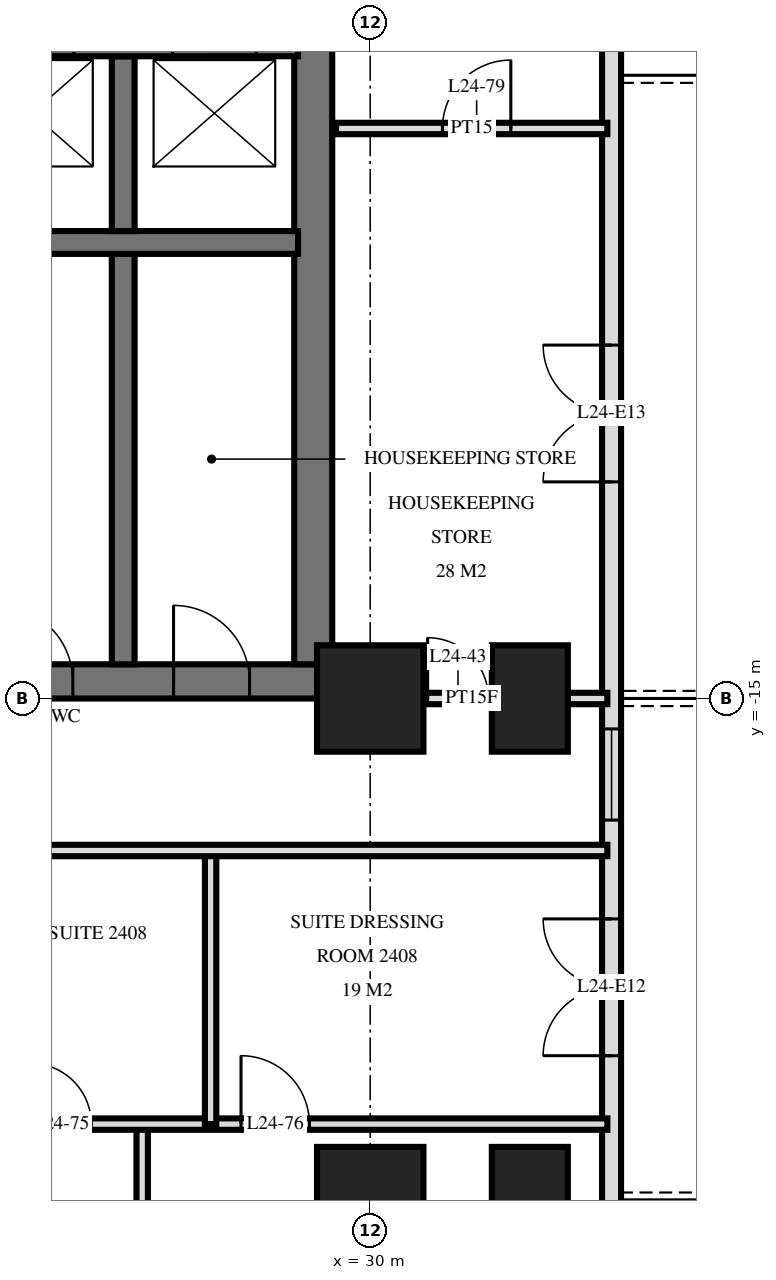
"""IFC4 building model, lengths in metres.
Left out: names, types, materials, properties, quantities, classifications, styles, units other than length and angle.
Written with IfcOpenShell. Run it as: python <this file> out.ifc"""

import sys

from ifc_helpers import new_model, si_unit, direction, frame, frame_2d, origin, origin_2d, place, context, subcontext, project, spatial, rectangle, extrude, element, fill, save


model = new_model("IFC4")
c1 = context("Model", 3, precision=1e-05, world=origin(), true_north=direction((0.0, 1.0)))
c2 = subcontext(c1, "Body", "Model", "MODEL_VIEW")
j1 = project(units=[si_unit("LENGTHUNIT", "METRE"), si_unit("PLANEANGLEUNIT", "RADIAN")], contexts=[c1])
p1 = place(None, origin())
s1 = spatial("IfcSite", under=j1, at=p1, CompositionType="ELEMENT")
p2 = place(p1, origin())
s2 = spatial("IfcBuilding", under=s1, at=p2, CompositionType="ELEMENT")
p3 = place(p2, frame((0.0, 0.0, 96.0)))
s3 = spatial("IfcBuildingStorey", under=s2, at=p3, CompositionType="ELEMENT", Elevation=96.0)
for number, where, z_axis, x_axis in (
    (1, (30.0, -21.6, 0.0), (0.0, 0.0, 1.0), (1.0, 0.0, 0.0)),
    (2, (30.0, -15.0, 0.0), (0.0, 0.0, 1.0), (1.0, 0.0, 0.0)),
):
    element("IfcColumn", number, at=place(p3, frame(where, z_axis=z_axis, x_axis=x_axis)), inside=s3, PredefinedType="COLUMN", context=c2, shape_type="SweptSolid", body=[
        extrude(rectangle(XDim=1.4, YDim=1.4, at=origin_2d()), origin(), (0.0, 0.0, 1.0), 3.6),
    ])
for number, where, z_axis, x_axis in (
    (3, (32.1, -21.6, 0.0), (0.0, 0.0, 1.0), (0.0, 1.0, 0.0)),
    (4, (32.1, -15.0, 0.0), (0.0, 0.0, 1.0), (0.0, 1.0, 0.0)),
):
    element("IfcColumn", number, at=place(p3, frame(where, z_axis=z_axis, x_axis=x_axis)), inside=s3, PredefinedType="COLUMN", context=c2, shape_type="SweptSolid", body=[
        extrude(rectangle(XDim=1.4, YDim=1.0, at=origin_2d()), origin(), (0.0, 0.0, 1.0), 3.6),
    ])
p4 = place(p3, frame((10.0, -14.775, 0.0), z_axis=(0.0, 0.0, 1.0), x_axis=(1.0, 0.0, 0.0)))
e5 = element("IfcWall", 5, at=p4, inside=s3, PredefinedType="SHEAR", context=c2, shape_type="SweptSolid", body=[
    extrude(rectangle(XDim=19.5, YDim=0.45, at=frame_2d((9.75, 0.0))), origin(), (0.0, 0.0, 1.0), 3.6),
])
p5 = place(p4, frame((7.1, 0.0, 0.0)))
e6 = element("IfcOpeningElement", 6, at=p5, cuts=e5, PredefinedType="OPENING", context=c2, shape_type="SweptSolid", body=[
    extrude(rectangle(XDim=1.2, YDim=2.1, at=frame_2d((0.6, 1.05))), frame((0.0, 0.235, 0.0), z_axis=(0.0, -1.0, 0.0), x_axis=(1.0, 0.0, 0.0)), (0.0, 0.0, 1.0), 0.47),
])
p6 = place(p4, frame((4.15, 0.0, 0.0)))
e7 = element("IfcOpeningElement", 7, at=p6, cuts=e5, PredefinedType="OPENING", context=c2, shape_type="SweptSolid", body=[
    extrude(rectangle(XDim=1.1, YDim=2.1, at=frame_2d((0.55, 1.05))), frame((0.0, 0.235, 0.0), z_axis=(0.0, -1.0, 0.0), x_axis=(1.0, 0.0, 0.0)), (0.0, 0.0, 1.0), 0.47),
])
p7 = place(p4, frame((10.1, 0.0, 0.0)))
e8 = element("IfcOpeningElement", 8, at=p7, cuts=e5, PredefinedType="OPENING", context=c2, shape_type="SweptSolid", body=[
    extrude(rectangle(XDim=0.9, YDim=2.1, at=frame_2d((0.45, 1.05))), frame((0.0, 0.235, 0.0), z_axis=(0.0, -1.0, 0.0), x_axis=(1.0, 0.0, 0.0)), (0.0, 0.0, 1.0), 0.47),
])
p8 = place(p4, frame((12.45, 0.0, 0.0)))
e9 = element("IfcOpeningElement", 9, at=p8, cuts=e5, PredefinedType="OPENING", context=c2, shape_type="SweptSolid", body=[
    extrude(rectangle(XDim=1.0, YDim=2.1, at=frame_2d((0.5, 1.05))), frame((0.0, 0.235, 0.0), z_axis=(0.0, -1.0, 0.0), x_axis=(1.0, 0.0, 0.0)), (0.0, 0.0, 1.0), 0.47),
])
p9 = place(p4, frame((15.087, 0.0, 0.0)))
e10 = element("IfcOpeningElement", 10, at=p9, cuts=e5, PredefinedType="OPENING", context=c2, shape_type="SweptSolid", body=[
    extrude(rectangle(XDim=1.0, YDim=2.1, at=frame_2d((0.5, 1.05))), frame((0.0, 0.235, 0.0), z_axis=(0.0, -1.0, 0.0), x_axis=(1.0, 0.0, 0.0)), (0.0, 0.0, 1.0), 0.47),
])
p10 = place(p4, frame((17.413, 0.0, 0.0)))
e11 = element("IfcOpeningElement", 11, at=p10, cuts=e5, PredefinedType="OPENING", context=c2, shape_type="SweptSolid", body=[
    extrude(rectangle(XDim=1.0, YDim=2.1, at=frame_2d((0.5, 1.05))), frame((0.0, 0.235, 0.0), z_axis=(0.0, -1.0, 0.0), x_axis=(1.0, 0.0, 0.0)), (0.0, 0.0, 1.0), 0.47),
])
p11 = place(p3, frame((29.25, -14.55, 0.0), z_axis=(0.0, 0.0, 1.0), x_axis=(0.0, 1.0, 0.0)))
e12 = element("IfcWall", 12, at=p11, inside=s3, PredefinedType="SHEAR", context=c2, shape_type="SweptSolid", body=[
    extrude(rectangle(XDim=14.1, YDim=0.5, at=frame_2d((7.05, 0.0))), origin(), (0.0, 0.0, 1.0), 3.6),
])
p12 = place(p3, frame((10.35, -6.4, 0.0), z_axis=(0.0, 0.0, 1.0), x_axis=(1.0, 0.0, 0.0)))
e13 = element("IfcWall", 13, at=p12, inside=s3, PredefinedType="SHEAR", context=c2, shape_type="SweptSolid", body=[
    extrude(rectangle(XDim=18.7, YDim=0.3, at=frame_2d((9.35, 0.0))), origin(), (0.0, 0.0, 1.0), 3.6),
])
p13 = place(p12, frame((14.65, 0.0, 0.0)))
e14 = element("IfcOpeningElement", 14, at=p13, cuts=e13, PredefinedType="OPENING", context=c2, shape_type="SweptSolid", body=[
    extrude(rectangle(XDim=1.1, YDim=2.1, at=frame_2d((0.55, 1.05))), frame((0.0, 0.16, 0.0), z_axis=(0.0, -1.0, 0.0), x_axis=(1.0, 0.0, 0.0)), (0.0, 0.0, 1.0), 0.32),
])
p14 = place(p12, frame((17.05, 0.0, 0.0)))
e15 = element("IfcOpeningElement", 15, at=p14, cuts=e13, PredefinedType="OPENING", context=c2, shape_type="SweptSolid", body=[
    extrude(rectangle(XDim=1.1, YDim=2.1, at=frame_2d((0.55, 1.05))), frame((0.0, 0.16, 0.0), z_axis=(0.0, -1.0, 0.0), x_axis=(1.0, 0.0, 0.0)), (0.0, 0.0, 1.0), 0.32),
])
p15 = place(p12, frame((6.8, 0.0, 0.0)))
e16 = element("IfcOpeningElement", 16, at=p15, cuts=e13, PredefinedType="OPENING", context=c2, shape_type="SweptSolid", body=[
    extrude(rectangle(XDim=1.1, YDim=2.1, at=frame_2d((0.55, 1.05))), frame((0.0, 0.16, 0.0), z_axis=(0.0, -1.0, 0.0), x_axis=(1.0, 0.0, 0.0)), (0.0, 0.0, 1.0), 0.32),
])
p16 = place(p12, frame((12.1, 0.0, 0.0)))
e17 = element("IfcOpeningElement", 17, at=p16, cuts=e13, PredefinedType="OPENING", context=c2, shape_type="SweptSolid", body=[
    extrude(rectangle(XDim=1.0, YDim=2.1, at=frame_2d((0.5, 1.05))), frame((0.0, 0.16, 0.0), z_axis=(0.0, -1.0, 0.0), x_axis=(1.0, 0.0, 0.0)), (0.0, 0.0, 1.0), 0.32),
])
p17 = place(p3, frame((10.35, -9.0, 0.0), z_axis=(0.0, 0.0, 1.0), x_axis=(1.0, 0.0, 0.0)))
e18 = element("IfcWall", 18, at=p17, inside=s3, PredefinedType="SHEAR", context=c2, shape_type="SweptSolid", body=[
    extrude(rectangle(XDim=18.7, YDim=0.3, at=frame_2d((9.35, 0.0))), origin(), (0.0, 0.0, 1.0), 3.6),
])
p18 = place(p17, frame((3.8, 0.0, 0.0)))
e19 = element("IfcOpeningElement", 19, at=p18, cuts=e18, PredefinedType="OPENING", context=c2, shape_type="SweptSolid", body=[
    extrude(rectangle(XDim=1.1, YDim=2.1, at=frame_2d((0.55, 1.05))), frame((0.0, 0.16, 0.0), z_axis=(0.0, -1.0, 0.0), x_axis=(1.0, 0.0, 0.0)), (0.0, 0.0, 1.0), 0.32),
])
p19 = place(p3, frame((26.75, -8.85, 0.0), z_axis=(0.0, 0.0, 1.0), x_axis=(0.0, 1.0, 0.0)))
e20 = element("IfcWall", 20, at=p19, inside=s3, PredefinedType="SHEAR", context=c2, shape_type="SweptSolid", body=[
    extrude(rectangle(XDim=2.3, YDim=0.3, at=frame_2d((1.15, 0.0))), origin(), (0.0, 0.0, 1.0), 3.6),
])
p20 = place(p3, frame((26.75, -14.55, 0.0), z_axis=(0.0, 0.0, 1.0), x_axis=(0.0, 1.0, 0.0)))
e21 = element("IfcWall", 21, at=p20, inside=s3, PredefinedType="SHEAR", context=c2, shape_type="SweptSolid", body=[
    extrude(rectangle(XDim=5.4, YDim=0.3, at=frame_2d((2.7, 0.0))), origin(), (0.0, 0.0, 1.0), 3.6),
])
p21 = place(p3, frame((33.175, -24.875, 0.0), z_axis=(0.0, 0.0, 1.0), x_axis=(0.0, 1.0, 0.0)))
e22 = element("IfcWall", 22, at=p21, inside=s3, PredefinedType="SOLIDWALL", context=c2, shape_type="SweptSolid", body=[
    extrude(rectangle(XDim=21.551, YDim=0.25, at=frame_2d((10.775, 0.0))), origin(), (0.0, 0.0, 1.0), 3.32),
])
p22 = place(p21, frame((0.575, 0.0, 0.0)))
e23 = element("IfcOpeningElement", 23, at=p22, cuts=e22, PredefinedType="OPENING", context=c2, shape_type="SweptSolid", body=[
    extrude(rectangle(XDim=1.8, YDim=2.4, at=frame_2d((0.9, 1.2))), frame((0.0, 0.135, 0.0), z_axis=(0.0, -1.0, 0.0), x_axis=(1.0, 0.0, 0.0)), (0.0, 0.0, 1.0), 0.27),
])
p23 = place(p21, frame((5.175, 0.0, 0.0)))
e24 = element("IfcOpeningElement", 24, at=p23, cuts=e22, PredefinedType="OPENING", context=c2, shape_type="SweptSolid", body=[
    extrude(rectangle(XDim=1.8, YDim=2.4, at=frame_2d((0.9, 1.2))), frame((0.0, 0.135, 0.0), z_axis=(0.0, -1.0, 0.0), x_axis=(1.0, 0.0, 0.0)), (0.0, 0.0, 1.0), 0.27),
])
p24 = place(p21, frame((8.275, 0.0, 0.3)))
e25 = element("IfcOpeningElement", 25, at=p24, cuts=e22, PredefinedType="OPENING", context=c2, shape_type="SweptSolid", body=[
    extrude(rectangle(XDim=1.2, YDim=2.1, at=frame_2d((0.6, 1.05))), frame((0.0, 0.135, 0.0), z_axis=(0.0, -1.0, 0.0), x_axis=(1.0, 0.0, 0.0)), (0.0, 0.0, 1.0), 0.27),
])
p25 = place(p21, frame((12.725, 0.0, 0.0)))
e26 = element("IfcOpeningElement", 26, at=p25, cuts=e22, PredefinedType="OPENING", context=c2, shape_type="SweptSolid", body=[
    extrude(rectangle(XDim=1.8, YDim=2.4, at=frame_2d((0.9, 1.2))), frame((0.0, 0.135, 0.0), z_axis=(0.0, -1.0, 0.0), x_axis=(1.0, 0.0, 0.0)), (0.0, 0.0, 1.0), 0.27),
])
p26 = place(p3, frame((27.9, -20.6, 0.0), z_axis=(0.0, 0.0, 1.0), x_axis=(0.0, 1.0, 0.0)))
e27 = element("IfcWall", 27, at=p26, inside=s3, PredefinedType="PARTITIONING", context=c2, shape_type="SweptSolid", body=[
    extrude(rectangle(XDim=3.6, YDim=0.15, at=frame_2d((1.8, 0.0))), origin(), (0.0, 0.0, 1.0), 3.32),
])
p27 = place(p3, frame((27.0, -29.22, 0.0), z_axis=(0.0, 0.0, 1.0), x_axis=(0.0, 1.0, 0.0)))
e28 = element("IfcWall", 28, at=p27, inside=s3, PredefinedType="PARTITIONING", context=c2, shape_type="SweptSolid", body=[
    extrude(rectangle(XDim=8.62, YDim=0.15, at=frame_2d((4.31, 0.0))), origin(), (0.0, 0.0, 1.0), 3.32),
])
p28 = place(p27, frame((3.77, 0.0, 0.0)))
e29 = element("IfcOpeningElement", 29, at=p28, cuts=e28, PredefinedType="OPENING", context=c2, shape_type="SweptSolid", body=[
    extrude(rectangle(XDim=0.9, YDim=2.1, at=frame_2d((0.45, 1.05))), frame((0.0, 0.085, 0.0), z_axis=(0.0, -1.0, 0.0), x_axis=(1.0, 0.0, 0.0)), (0.0, 0.0, 1.0), 0.17),
])
p29 = place(p3, frame((24.9, -20.6, 0.0), z_axis=(0.0, 0.0, 1.0), x_axis=(1.0, 0.0, 0.0)))
e30 = element("IfcWall", 30, at=p29, inside=s3, PredefinedType="PARTITIONING", context=c2, shape_type="SweptSolid", body=[
    extrude(rectangle(XDim=8.22, YDim=0.15, at=frame_2d((4.11, 0.0))), origin(), (0.0, 0.0, 1.0), 3.32),
])
p30 = place(p29, frame((0.63, 0.0, 0.0)))
e31 = element("IfcOpeningElement", 31, at=p30, cuts=e30, PredefinedType="OPENING", context=c2, shape_type="SweptSolid", body=[
    extrude(rectangle(XDim=0.8, YDim=2.1, at=frame_2d((0.4, 1.05))), frame((0.0, 0.085, 0.0), z_axis=(0.0, -1.0, 0.0), x_axis=(1.0, 0.0, 0.0)), (0.0, 0.0, 1.0), 0.17),
])
p31 = place(p29, frame((3.4, 0.0, 0.0)))
e32 = element("IfcOpeningElement", 32, at=p31, cuts=e30, PredefinedType="OPENING", context=c2, shape_type="SweptSolid", body=[
    extrude(rectangle(XDim=0.9, YDim=2.1, at=frame_2d((0.45, 1.05))), frame((0.0, 0.085, 0.0), z_axis=(0.0, -1.0, 0.0), x_axis=(1.0, 0.0, 0.0)), (0.0, 0.0, 1.0), 0.17),
])
p32 = place(p3, frame((-33.12, -17.0, 0.0), z_axis=(0.0, 0.0, 1.0), x_axis=(1.0, 0.0, 0.0)))
e33 = element("IfcWall", 33, at=p32, inside=s3, PredefinedType="PARTITIONING", context=c2, shape_type="SweptSolid", body=[
    extrude(rectangle(XDim=66.24, YDim=0.15, at=frame_2d((33.12, 0.0))), origin(), (0.0, 0.0, 1.0), 3.32),
])
p33 = place(p32, frame((16.27, 0.0, 0.0)))
e34 = element("IfcOpeningElement", 34, at=p33, cuts=e33, PredefinedType="OPENING", context=c2, shape_type="SweptSolid", body=[
    extrude(rectangle(XDim=1.0, YDim=2.1, at=frame_2d((0.5, 1.05))), frame((0.0, 0.085, 0.0), z_axis=(0.0, -1.0, 0.0), x_axis=(1.0, 0.0, 0.0)), (0.0, 0.0, 1.0), 0.17),
])
p34 = place(p32, frame((22.97, 0.0, 0.0)))
e35 = element("IfcOpeningElement", 35, at=p34, cuts=e33, PredefinedType="OPENING", context=c2, shape_type="SweptSolid", body=[
    extrude(rectangle(XDim=1.0, YDim=2.1, at=frame_2d((0.5, 1.05))), frame((0.0, 0.085, 0.0), z_axis=(0.0, -1.0, 0.0), x_axis=(1.0, 0.0, 0.0)), (0.0, 0.0, 1.0), 0.17),
])
p35 = place(p32, frame((34.42, 0.0, 0.0)))
e36 = element("IfcOpeningElement", 36, at=p35, cuts=e33, PredefinedType="OPENING", context=c2, shape_type="SweptSolid", body=[
    extrude(rectangle(XDim=1.0, YDim=2.1, at=frame_2d((0.5, 1.05))), frame((0.0, 0.085, 0.0), z_axis=(0.0, -1.0, 0.0), x_axis=(1.0, 0.0, 0.0)), (0.0, 0.0, 1.0), 0.17),
])
p36 = place(p32, frame((39.22, 0.0, 0.0)))
e37 = element("IfcOpeningElement", 37, at=p36, cuts=e33, PredefinedType="OPENING", context=c2, shape_type="SweptSolid", body=[
    extrude(rectangle(XDim=1.0, YDim=2.1, at=frame_2d((0.5, 1.05))), frame((0.0, 0.085, 0.0), z_axis=(0.0, -1.0, 0.0), x_axis=(1.0, 0.0, 0.0)), (0.0, 0.0, 1.0), 0.17),
])
p37 = place(p32, frame((42.27, 0.0, 0.0)))
e38 = element("IfcOpeningElement", 38, at=p37, cuts=e33, PredefinedType="OPENING", context=c2, shape_type="SweptSolid", body=[
    extrude(rectangle(XDim=1.0, YDim=2.1, at=frame_2d((0.5, 1.05))), frame((0.0, 0.085, 0.0), z_axis=(0.0, -1.0, 0.0), x_axis=(1.0, 0.0, 0.0)), (0.0, 0.0, 1.0), 0.17),
])
p38 = place(p32, frame((45.82, 0.0, 0.0)))
e39 = element("IfcOpeningElement", 39, at=p38, cuts=e33, PredefinedType="OPENING", context=c2, shape_type="SweptSolid", body=[
    extrude(rectangle(XDim=1.0, YDim=2.1, at=frame_2d((0.5, 1.05))), frame((0.0, 0.085, 0.0), z_axis=(0.0, -1.0, 0.0), x_axis=(1.0, 0.0, 0.0)), (0.0, 0.0, 1.0), 0.17),
])
p39 = place(p32, frame((13.42, 0.0, 0.0)))
e40 = element("IfcOpeningElement", 40, at=p39, cuts=e33, PredefinedType="OPENING", context=c2, shape_type="SweptSolid", body=[
    extrude(rectangle(XDim=1.0, YDim=2.1, at=frame_2d((0.5, 1.05))), frame((0.0, 0.085, 0.0), z_axis=(0.0, -1.0, 0.0), x_axis=(1.0, 0.0, 0.0)), (0.0, 0.0, 1.0), 0.17),
])
p40 = place(p32, frame((54.82, 0.0, 0.0)))
e41 = element("IfcOpeningElement", 41, at=p40, cuts=e33, PredefinedType="OPENING", context=c2, shape_type="SweptSolid", body=[
    extrude(rectangle(XDim=1.0, YDim=2.1, at=frame_2d((0.5, 1.05))), frame((0.0, 0.085, 0.0), z_axis=(0.0, -1.0, 0.0), x_axis=(1.0, 0.0, 0.0)), (0.0, 0.0, 1.0), 0.17),
])
p41 = place(p3, frame((29.55, -15.0, 0.0), z_axis=(0.0, 0.0, 1.0), x_axis=(1.0, 0.0, 0.0)))
e42 = element("IfcWall", 42, at=p41, inside=s3, PredefinedType="PARTITIONING", context=c2, shape_type="SweptSolid", body=[
    extrude(rectangle(XDim=3.57, YDim=0.15, at=frame_2d((1.785, 0.0))), origin(), (0.0, 0.0, 1.0), 3.32),
])
p42 = place(p41, frame((1.205, 0.0, 0.0)))
e43 = element("IfcOpeningElement", 43, at=p42, cuts=e42, PredefinedType="OPENING", context=c2, shape_type="SweptSolid", body=[
    extrude(rectangle(XDim=0.8, YDim=2.1, at=frame_2d((0.4, 1.05))), frame((0.0, 0.085, 0.0), z_axis=(0.0, -1.0, 0.0), x_axis=(1.0, 0.0, 0.0)), (0.0, 0.0, 1.0), 0.17),
])
p43 = place(p3, frame((29.55, -7.5, 0.0), z_axis=(0.0, 0.0, 1.0), x_axis=(1.0, 0.0, 0.0)))
e44 = element("IfcWall", 44, at=p43, inside=s3, PredefinedType="PARTITIONING", context=c2, shape_type="SweptSolid", body=[
    extrude(rectangle(XDim=3.57, YDim=0.15, at=frame_2d((1.785, 0.0))), origin(), (0.0, 0.0, 1.0), 3.32),
])
p44 = place(p43, frame((1.4, 0.0, 0.0)))
e45 = element("IfcOpeningElement", 45, at=p44, cuts=e44, PredefinedType="OPENING", context=c2, shape_type="SweptSolid", body=[
    extrude(rectangle(XDim=0.9, YDim=2.1, at=frame_2d((0.45, 1.05))), frame((0.0, 0.085, 0.0), z_axis=(0.0, -1.0, 0.0), x_axis=(1.0, 0.0, 0.0)), (0.0, 0.0, 1.0), 0.17),
])
p45 = place(p23, origin())
e46 = element("IfcDoor", 46, at=p45, inside=s3, OperationType="DOUBLE_DOOR_SINGLE_SWING", PredefinedType="DOOR", context=c2, shape_type="SweptSolid", body=[
    extrude(rectangle(XDim=1.8, YDim=2.4, at=frame_2d((0.9, 1.2))), frame((0.0, 0.025, 0.0), z_axis=(0.0, -1.0, 0.0), x_axis=(1.0, 0.0, 0.0)), (0.0, 0.0, 1.0), 0.05),
])
fill(e24, e46)
p46 = place(p24, origin())
e47 = element("IfcWindow", 47, at=p46, inside=s3, PartitioningType="SINGLE_PANEL", PredefinedType="WINDOW", context=c2, shape_type="SweptSolid", body=[
    extrude(rectangle(XDim=1.2, YDim=2.1, at=frame_2d((0.6, 1.05))), frame((0.0, 0.03, 0.0), z_axis=(0.0, -1.0, 0.0), x_axis=(1.0, 0.0, 0.0)), (0.0, 0.0, 1.0), 0.06),
])
fill(e25, e47)
p47 = place(p25, origin())
e48 = element("IfcDoor", 48, at=p47, inside=s3, OperationType="DOUBLE_DOOR_SINGLE_SWING", PredefinedType="DOOR", context=c2, shape_type="SweptSolid", body=[
    extrude(rectangle(XDim=1.8, YDim=2.4, at=frame_2d((0.9, 1.2))), frame((0.0, 0.025, 0.0), z_axis=(0.0, -1.0, 0.0), x_axis=(1.0, 0.0, 0.0)), (0.0, 0.0, 1.0), 0.05),
])
fill(e26, e48)
p48 = place(p9, origin())
e49 = element("IfcDoor", 49, at=p48, inside=s3, OperationType="SINGLE_SWING_RIGHT", PredefinedType="DOOR", context=c2, shape_type="SweptSolid", body=[
    extrude(rectangle(XDim=1.0, YDim=2.1, at=frame_2d((0.5, 1.05))), frame((0.0, 0.025, 0.0), z_axis=(0.0, -1.0, 0.0), x_axis=(1.0, 0.0, 0.0)), (0.0, 0.0, 1.0), 0.05),
])
fill(e10, e49)
p49 = place(p10, origin())
e50 = element("IfcDoor", 50, at=p49, inside=s3, OperationType="SINGLE_SWING_RIGHT", PredefinedType="DOOR", context=c2, shape_type="SweptSolid", body=[
    extrude(rectangle(XDim=1.0, YDim=2.1, at=frame_2d((0.5, 1.05))), frame((0.0, 0.025, 0.0), z_axis=(0.0, -1.0, 0.0), x_axis=(1.0, 0.0, 0.0)), (0.0, 0.0, 1.0), 0.05),
])
fill(e11, e50)
p50 = place(p42, origin())
e51 = element("IfcDoor", 51, at=p50, inside=s3, OperationType="SINGLE_SWING_RIGHT", PredefinedType="DOOR", context=c2, shape_type="SweptSolid", body=[
    extrude(rectangle(XDim=0.8, YDim=2.1, at=frame_2d((0.4, 1.05))), frame((0.0, 0.025, 0.0), z_axis=(0.0, -1.0, 0.0), x_axis=(1.0, 0.0, 0.0)), (0.0, 0.0, 1.0), 0.05),
])
fill(e43, e51)
p51 = place(p30, origin())
e52 = element("IfcDoor", 52, at=p51, inside=s3, OperationType="SINGLE_SWING_RIGHT", PredefinedType="DOOR", context=c2, shape_type="SweptSolid", body=[
    extrude(rectangle(XDim=0.8, YDim=2.1, at=frame_2d((0.4, 1.05))), frame((0.0, 0.025, 0.0), z_axis=(0.0, -1.0, 0.0), x_axis=(1.0, 0.0, 0.0)), (0.0, 0.0, 1.0), 0.05),
])
fill(e31, e52)
p52 = place(p31, origin())
e53 = element("IfcDoor", 53, at=p52, inside=s3, OperationType="SINGLE_SWING_RIGHT", PredefinedType="DOOR", context=c2, shape_type="SweptSolid", body=[
    extrude(rectangle(XDim=0.9, YDim=2.1, at=frame_2d((0.45, 1.05))), frame((0.0, 0.025, 0.0), z_axis=(0.0, -1.0, 0.0), x_axis=(1.0, 0.0, 0.0)), (0.0, 0.0, 1.0), 0.05),
])
fill(e32, e53)
p53 = place(p44, origin())
e54 = element("IfcDoor", 54, at=p53, inside=s3, OperationType="SINGLE_SWING_LEFT", PredefinedType="DOOR", context=c2, shape_type="SweptSolid", body=[
    extrude(rectangle(XDim=0.9, YDim=2.1, at=frame_2d((0.45, 1.05))), frame((0.0, 0.025, 0.0), z_axis=(0.0, -1.0, 0.0), x_axis=(1.0, 0.0, 0.0)), (0.0, 0.0, 1.0), 0.05),
])
fill(e45, e54)
save(model, sys.argv[1])
